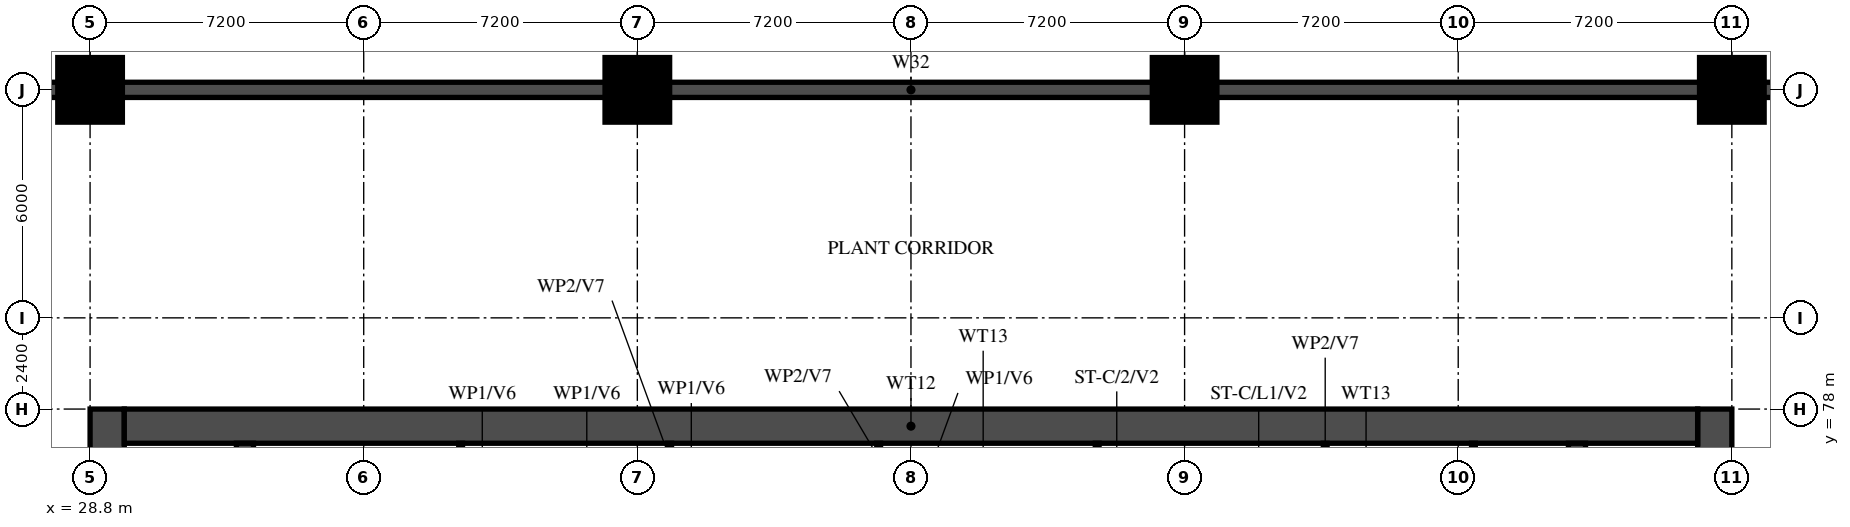
"""IFC4 building model, lengths in metres.
Left out: names, types, materials, properties, quantities, classifications, styles, units other than length and angle.
Written with IfcOpenShell. Run it as: python <this file> out.ifc"""

import sys

from ifc_helpers import new_model, si_unit, direction, frame, frame_2d, origin, origin_2d, place, context, subcontext, project, spatial, rectangle, extrude, source, transform, mapped, element, save


model = new_model("IFC4")
c1 = context("Model", 3, precision=1e-05, world=origin(), true_north=direction((0.0, 1.0)))
c2 = subcontext(c1, "Body", "Model", "MODEL_VIEW")
j1 = project(units=[si_unit("LENGTHUNIT", "METRE"), si_unit("PLANEANGLEUNIT", "RADIAN")], contexts=[c1])
p1 = place(None, origin())
s1 = spatial("IfcSite", under=j1, at=p1, CompositionType="ELEMENT")
p2 = place(p1, origin())
s2 = spatial("IfcBuilding", under=s1, at=p2, CompositionType="ELEMENT")
p3 = place(p2, frame((0.0, 0.0, -5.4)))
s3 = spatial("IfcBuildingStorey", under=s2, at=p3, CompositionType="ELEMENT", Elevation=-5.4)
m1 = source(origin(), c2, "Body", "SweptSolid", [
    extrude(rectangle(XDim=1.7, YDim=1.7, at=origin_2d()), origin(), (0.0, 0.0, 1.0), 5.0),
])
for number, where, z_axis, x_axis in (
    (1, (28.8, 86.4, 0.0), (0.0, 0.0, 1.0), (1.0, 0.0, 0.0)),
    (2, (43.2, 86.4, 0.0), (0.0, 0.0, 1.0), (1.0, 0.0, 0.0)),
    (3, (57.6, 86.4, 0.0), (0.0, 0.0, 1.0), (1.0, 0.0, 0.0)),
    (4, (72.0, 86.4, 0.0), (0.0, 0.0, 1.0), (1.0, 0.0, 0.0)),
):
    element("IfcColumn", number, at=place(p3, frame(where, z_axis=z_axis, x_axis=x_axis)), inside=s3, PredefinedType="COLUMN", context=c2, shape_type="MappedRepresentation", body=[
        mapped(m1, transform((0.0, 0.0, 0.0))),
    ])
for number, where, z_axis, x_axis in (
    (5, (29.25, 66.0, 0.0), (0.0, 0.0, 1.0), (0.0, 1.0, 0.0)),
    (6, (71.55, 66.0, 0.0), (0.0, 0.0, 1.0), (0.0, 1.0, 0.0)),
):
    element("IfcWall", number, at=place(p3, frame(where, z_axis=z_axis, x_axis=x_axis)), inside=s3, PredefinedType="SHEAR", context=c2, shape_type="SweptSolid", body=[
        extrude(rectangle(XDim=12.0, YDim=0.9, at=frame_2d((6.0, 0.0))), origin(), (0.0, 0.0, 1.0), 5.0),
    ])
p4 = place(p3, frame((29.7, 77.55, 0.0), z_axis=(0.0, 0.0, 1.0), x_axis=(1.0, 0.0, 0.0)))
e7 = element("IfcWall", 7, at=p4, inside=s3, PredefinedType="SHEAR", context=c2, shape_type="SweptSolid", body=[
    extrude(rectangle(XDim=41.4, YDim=0.9, at=frame_2d((20.7, 0.0))), origin(), (0.0, 0.0, 1.0), 5.0),
])
p5 = place(p3, frame((32.875, 66.45, 0.0), z_axis=(0.0, 0.0, 1.0), x_axis=(0.0, 1.0, 0.0)))
e8 = element("IfcWall", 8, at=p5, inside=s3, PredefinedType="SHEAR", context=c2, shape_type="SweptSolid", body=[
    extrude(rectangle(XDim=10.65, YDim=0.45, at=frame_2d((5.325, 0.0))), origin(), (0.0, 0.0, 1.0), 5.0),
])
p6 = place(p3, frame((67.925, 66.45, 0.0), z_axis=(0.0, 0.0, 1.0), x_axis=(0.0, 1.0, 0.0)))
e9 = element("IfcWall", 9, at=p6, inside=s3, PredefinedType="SHEAR", context=c2, shape_type="SweptSolid", body=[
    extrude(rectangle(XDim=10.65, YDim=0.45, at=frame_2d((5.325, 0.0))), origin(), (0.0, 0.0, 1.0), 5.0),
])
p7 = place(p6, frame((0.15, 0.0, 0.0)))
e10 = element("IfcOpeningElement", 10, at=p7, cuts=e9, PredefinedType="OPENING", context=c2, shape_type="SweptSolid", body=[
    extrude(rectangle(XDim=1.1, YDim=2.1, at=frame_2d((0.55, 1.05))), frame((0.0, 0.235, 0.0), z_axis=(0.0, -1.0, 0.0), x_axis=(1.0, 0.0, 0.0)), (0.0, 0.0, 1.0), 0.47),
])
for number, where, z_axis, x_axis in (
    (11, (38.55, 76.325, 0.0), (0.0, 0.0, 1.0), (0.0, 1.0, 0.0)),
    (12, (44.05, 76.325, 0.0), (0.0, 0.0, 1.0), (0.0, 1.0, 0.0)),
    (13, (49.55, 76.325, 0.0), (0.0, 0.0, 1.0), (0.0, 1.0, 0.0)),
    (14, (55.3, 76.325, 0.0), (0.0, 0.0, 1.0), (0.0, 1.0, 0.0)),
    (15, (61.3, 76.325, 0.0), (0.0, 0.0, 1.0), (0.0, 1.0, 0.0)),
    (16, (65.2, 76.325, 0.0), (0.0, 0.0, 1.0), (0.0, 1.0, 0.0)),
):
    element("IfcWall", number, at=place(p3, frame(where, z_axis=z_axis, x_axis=x_axis)), inside=s3, PredefinedType="PARTITIONING", context=c2, shape_type="SweptSolid", body=[
        extrude(rectangle(XDim=0.775, YDim=0.1, at=frame_2d((0.388, 0.0))), origin(), (0.0, 0.0, 1.0), 5.0),
    ])
p8 = place(p3, frame((4.8, 86.4, 0.0), z_axis=(0.0, 0.0, 1.0), x_axis=(1.0, 0.0, 0.0)))
e17 = element("IfcWall", 17, at=p8, inside=s3, PredefinedType="SOLIDWALL", context=c2, shape_type="SweptSolid", body=[
    extrude(rectangle(XDim=91.2, YDim=0.4, at=frame_2d((45.6, 0.0))), origin(), (0.0, 0.0, 1.0), 5.0),
])
save(model, sys.argv[1])
